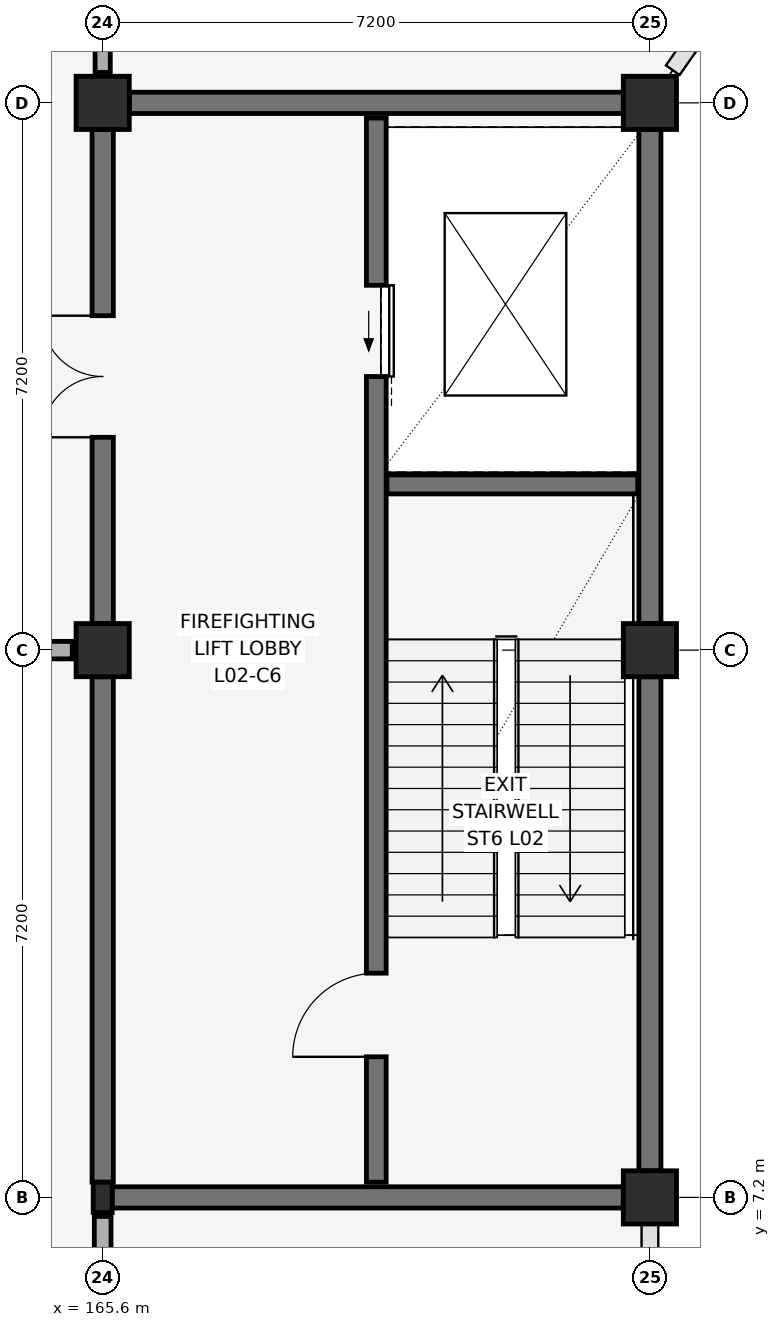
"""IFC4 building model, lengths in metres.
Left out: names, types, materials, properties, quantities, classifications, styles, units other than length and angle.
Written with IfcOpenShell. Run it as: python <this file> out.ifc"""

import sys

from ifc_helpers import new_model, si_unit, direction, frame, frame_2d, origin, origin_2d, place, context, subcontext, project, spatial, rectangle, hollow_rectangle, extrude, element, fill, save


model = new_model("IFC4")
c1 = context("Model", 3, precision=1e-05, world=origin(), true_north=direction((0.0, 1.0)))
c2 = subcontext(c1, "Body", "Model", "MODEL_VIEW")
j1 = project(units=[si_unit("LENGTHUNIT", "METRE"), si_unit("PLANEANGLEUNIT", "RADIAN")], contexts=[c1])
p1 = place(None, origin())
s1 = spatial("IfcSite", under=j1, at=p1, CompositionType="ELEMENT")
p2 = place(p1, origin())
s2 = spatial("IfcBuilding", under=s1, at=p2, CompositionType="ELEMENT")
p3 = place(p2, frame((0.0, 0.0, 10.2)))
s3 = spatial("IfcBuildingStorey", under=s2, at=p3, CompositionType="ELEMENT", Elevation=10.2)
p4 = place(p3, frame((165.6, 7.2, 0.0), z_axis=(0.0, 0.0, 1.0), x_axis=(1.0, 0.0, 0.0)))
e1 = element("IfcColumn", 1, at=p4, inside=s3, PredefinedType="COLUMN", context=c2, shape_type="SweptSolid", body=[
    extrude(hollow_rectangle(XDim=0.25, YDim=0.4, WallThickness=0.014, at=origin_2d()), origin(), (0.0, 0.0, 1.0), 4.8),
])
for number, where, z_axis, x_axis in (
    (2, (165.6, 14.4, 0.0), (0.0, 0.0, 1.0), (1.0, 0.0, 0.0)),
    (3, (165.6, 21.6, 0.0), (0.0, 0.0, 1.0), (1.0, 0.0, 0.0)),
    (4, (172.8, 7.2, 0.0), (0.0, 0.0, 1.0), (1.0, 0.0, 0.0)),
    (5, (172.8, 14.4, 0.0), (0.0, 0.0, 1.0), (1.0, 0.0, 0.0)),
    (6, (172.8, 21.6, 0.0), (0.0, 0.0, 1.0), (1.0, 0.0, 0.0)),
):
    element("IfcColumn", number, at=place(p3, frame(where, z_axis=z_axis, x_axis=x_axis)), inside=s3, PredefinedType="COLUMN", context=c2, shape_type="SweptSolid", body=[
        extrude(rectangle(XDim=0.7, YDim=0.7, at=origin_2d()), origin(), (0.0, 0.0, 1.0), 4.8),
    ])
p5 = place(p3, frame((165.725, 7.2, 0.0), z_axis=(0.0, 0.0, 1.0), x_axis=(1.0, 0.0, 0.0)))
e7 = element("IfcWall", 7, at=p5, inside=s3, PredefinedType="SHEAR", context=c2, shape_type="SweptSolid", body=[
    extrude(rectangle(XDim=6.725, YDim=0.28, at=frame_2d((3.362, 0.0))), origin(), (0.0, 0.0, 1.0), 4.56),
])
p6 = place(p3, frame((165.95, 21.6, 0.0), z_axis=(0.0, 0.0, 1.0), x_axis=(1.0, 0.0, 0.0)))
e8 = element("IfcWall", 8, at=p6, inside=s3, PredefinedType="SHEAR", context=c2, shape_type="SweptSolid", body=[
    extrude(rectangle(XDim=6.5, YDim=0.28, at=frame_2d((3.25, 0.0))), origin(), (0.0, 0.0, 1.0), 4.56),
])
p7 = place(p3, frame((165.6, 7.4, 0.0), z_axis=(0.0, 0.0, 1.0), x_axis=(0.0, 1.0, 0.0)))
e9 = element("IfcWall", 9, at=p7, inside=s3, PredefinedType="SHEAR", context=c2, shape_type="SweptSolid", body=[
    extrude(rectangle(XDim=6.65, YDim=0.28, at=frame_2d((3.325, 0.0))), origin(), (0.0, 0.0, 1.0), 4.56),
])
p8 = place(p3, frame((165.6, 14.75, 0.0), z_axis=(0.0, 0.0, 1.0), x_axis=(0.0, 1.0, 0.0)))
e10 = element("IfcWall", 10, at=p8, inside=s3, PredefinedType="SHEAR", context=c2, shape_type="SweptSolid", body=[
    extrude(rectangle(XDim=6.5, YDim=0.28, at=frame_2d((3.25, 0.0))), origin(), (0.0, 0.0, 1.0), 4.56),
])
p9 = place(p8, frame((2.45, 0.0, 0.0)))
e11 = element("IfcOpeningElement", 11, at=p9, cuts=e10, PredefinedType="OPENING", context=c2, shape_type="SweptSolid", body=[
    extrude(rectangle(XDim=1.6, YDim=2.2, at=frame_2d((0.8, 1.1))), frame((0.0, 0.155, 0.0), z_axis=(0.0, -1.0, 0.0), x_axis=(1.0, 0.0, 0.0)), (0.0, 0.0, 1.0), 0.31),
])
for number, where, z_axis, x_axis in (
    (12, (172.8, 7.55, 0.0), (0.0, 0.0, 1.0), (0.0, 1.0, 0.0)),
    (13, (172.8, 14.75, 0.0), (0.0, 0.0, 1.0), (0.0, 1.0, 0.0)),
):
    element("IfcWall", number, at=place(p3, frame(where, z_axis=z_axis, x_axis=x_axis)), inside=s3, PredefinedType="SHEAR", context=c2, shape_type="SweptSolid", body=[
        extrude(rectangle(XDim=6.5, YDim=0.29, at=frame_2d((3.25, 0.0))), origin(), (0.0, 0.0, 1.0), 4.56),
    ])
p10 = place(p3, frame((169.2, 7.4, 0.0), z_axis=(0.0, 0.0, 1.0), x_axis=(0.0, 1.0, 0.0)))
e14 = element("IfcWall", 14, at=p10, inside=s3, PredefinedType="SHEAR", context=c2, shape_type="SweptSolid", body=[
    extrude(rectangle(XDim=14.0, YDim=0.26, at=frame_2d((7.0, 0.0))), origin(), (0.0, 0.0, 1.0), 4.56),
])
p11 = place(p10, frame((1.65, 0.0, 0.0)))
e15 = element("IfcOpeningElement", 15, at=p11, cuts=e14, PredefinedType="OPENING", context=c2, shape_type="SweptSolid", body=[
    extrude(rectangle(XDim=1.1, YDim=2.15, at=frame_2d((0.55, 1.075))), frame((0.0, 0.145, 0.0), z_axis=(0.0, -1.0, 0.0), x_axis=(1.0, 0.0, 0.0)), (0.0, 0.0, 1.0), 0.29),
])
p12 = place(p10, frame((10.6, 0.0, 0.0)))
e16 = element("IfcOpeningElement", 16, at=p12, cuts=e14, PredefinedType="OPENING", context=c2, shape_type="SweptSolid", body=[
    extrude(rectangle(XDim=1.2, YDim=2.25, at=frame_2d((0.6, 1.125))), frame((0.0, 0.145, 0.0), z_axis=(0.0, -1.0, 0.0), x_axis=(1.0, 0.0, 0.0)), (0.0, 0.0, 1.0), 0.29),
])
p13 = place(p3, frame((169.34, 16.58, 0.0), z_axis=(0.0, 0.0, 1.0), x_axis=(1.0, 0.0, 0.0)))
e17 = element("IfcWall", 17, at=p13, inside=s3, PredefinedType="SHEAR", context=c2, shape_type="SweptSolid", body=[
    extrude(rectangle(XDim=3.3, YDim=0.25, at=frame_2d((1.65, 0.0))), origin(), (0.0, 0.0, 1.0), 4.56),
])
p14 = place(p3, frame((158.575, 14.4, 0.0), z_axis=(0.0, 0.0, 1.0), x_axis=(1.0, 0.0, 0.0)))
e18 = element("IfcWall", 18, at=p14, inside=s3, PredefinedType="SOLIDWALL", context=c2, shape_type="SweptSolid", body=[
    extrude(rectangle(XDim=6.625, YDim=0.23, at=frame_2d((3.312, 0.0))), origin(), (0.0, 0.0, 1.0), 4.072),
])
p15 = place(p3, frame((165.6, 0.4, 0.0), z_axis=(0.0, 0.0, 1.0), x_axis=(0.0, 1.0, 0.0)))
e19 = element("IfcWall", 19, at=p15, inside=s3, PredefinedType="SOLIDWALL", context=c2, shape_type="SweptSolid", body=[
    extrude(rectangle(XDim=6.55, YDim=0.22, at=frame_2d((3.275, 0.0))), origin(), (0.0, 0.0, 1.0), 4.072),
])
p16 = place(p3, frame((165.6, 22.0, 0.0), z_axis=(0.0, 0.0, 1.0), x_axis=(0.0, 1.0, 0.0)))
e20 = element("IfcWall", 20, at=p16, inside=s3, PredefinedType="SOLIDWALL", context=c2, shape_type="SweptSolid", body=[
    extrude(rectangle(XDim=6.4, YDim=0.2, at=frame_2d((3.2, 0.0))), origin(), (0.0, 0.0, 1.0), 4.17),
])
p17 = place(p16, frame((2.7, 0.0, 0.0)))
e21 = element("IfcOpeningElement", 21, at=p17, cuts=e20, PredefinedType="OPENING", context=c2, shape_type="SweptSolid", body=[
    extrude(rectangle(XDim=1.0, YDim=2.1, at=frame_2d((0.5, 1.05))), frame((0.0, 0.115, 0.0), z_axis=(0.0, -1.0, 0.0), x_axis=(1.0, 0.0, 0.0)), (0.0, 0.0, 1.0), 0.23),
])
p18 = place(p11, frame((1.1, 0.0, 0.0), z_axis=(0.0, 0.0, 1.0), x_axis=(-1.0, 0.0, 0.0)))
e22 = element("IfcDoor", 22, at=p18, inside=s3, OperationType="SINGLE_SWING_RIGHT", PredefinedType="DOOR", context=c2, shape_type="SweptSolid", body=[
    extrude(rectangle(XDim=1.1, YDim=2.15, at=frame_2d((0.55, 1.075))), frame((0.0, 0.025, 0.0), z_axis=(0.0, -1.0, 0.0), x_axis=(1.0, 0.0, 0.0)), (0.0, 0.0, 1.0), 0.05),
])
fill(e15, e22)
p19 = place(p12, origin())
e23 = element("IfcDoor", 23, at=p19, inside=s3, OperationType="SLIDING_TO_LEFT", PredefinedType="DOOR", context=c2, shape_type="SweptSolid", body=[
    extrude(rectangle(XDim=1.2, YDim=2.25, at=frame_2d((0.6, 1.125))), frame((0.0, 0.025, 0.0), z_axis=(0.0, -1.0, 0.0), x_axis=(1.0, 0.0, 0.0)), (0.0, 0.0, 1.0), 0.05),
])
fill(e16, e23)
p20 = place(p9, origin())
e24 = element("IfcDoor", 24, at=p20, inside=s3, OperationType="DOUBLE_SWING_LEFT", PredefinedType="DOOR", context=c2, shape_type="SweptSolid", body=[
    extrude(rectangle(XDim=1.6, YDim=2.2, at=frame_2d((0.8, 1.1))), frame((0.0, 0.025, 0.0), z_axis=(0.0, -1.0, 0.0), x_axis=(1.0, 0.0, 0.0)), (0.0, 0.0, 1.0), 0.05),
])
fill(e11, e24)
save(model, sys.argv[1])
